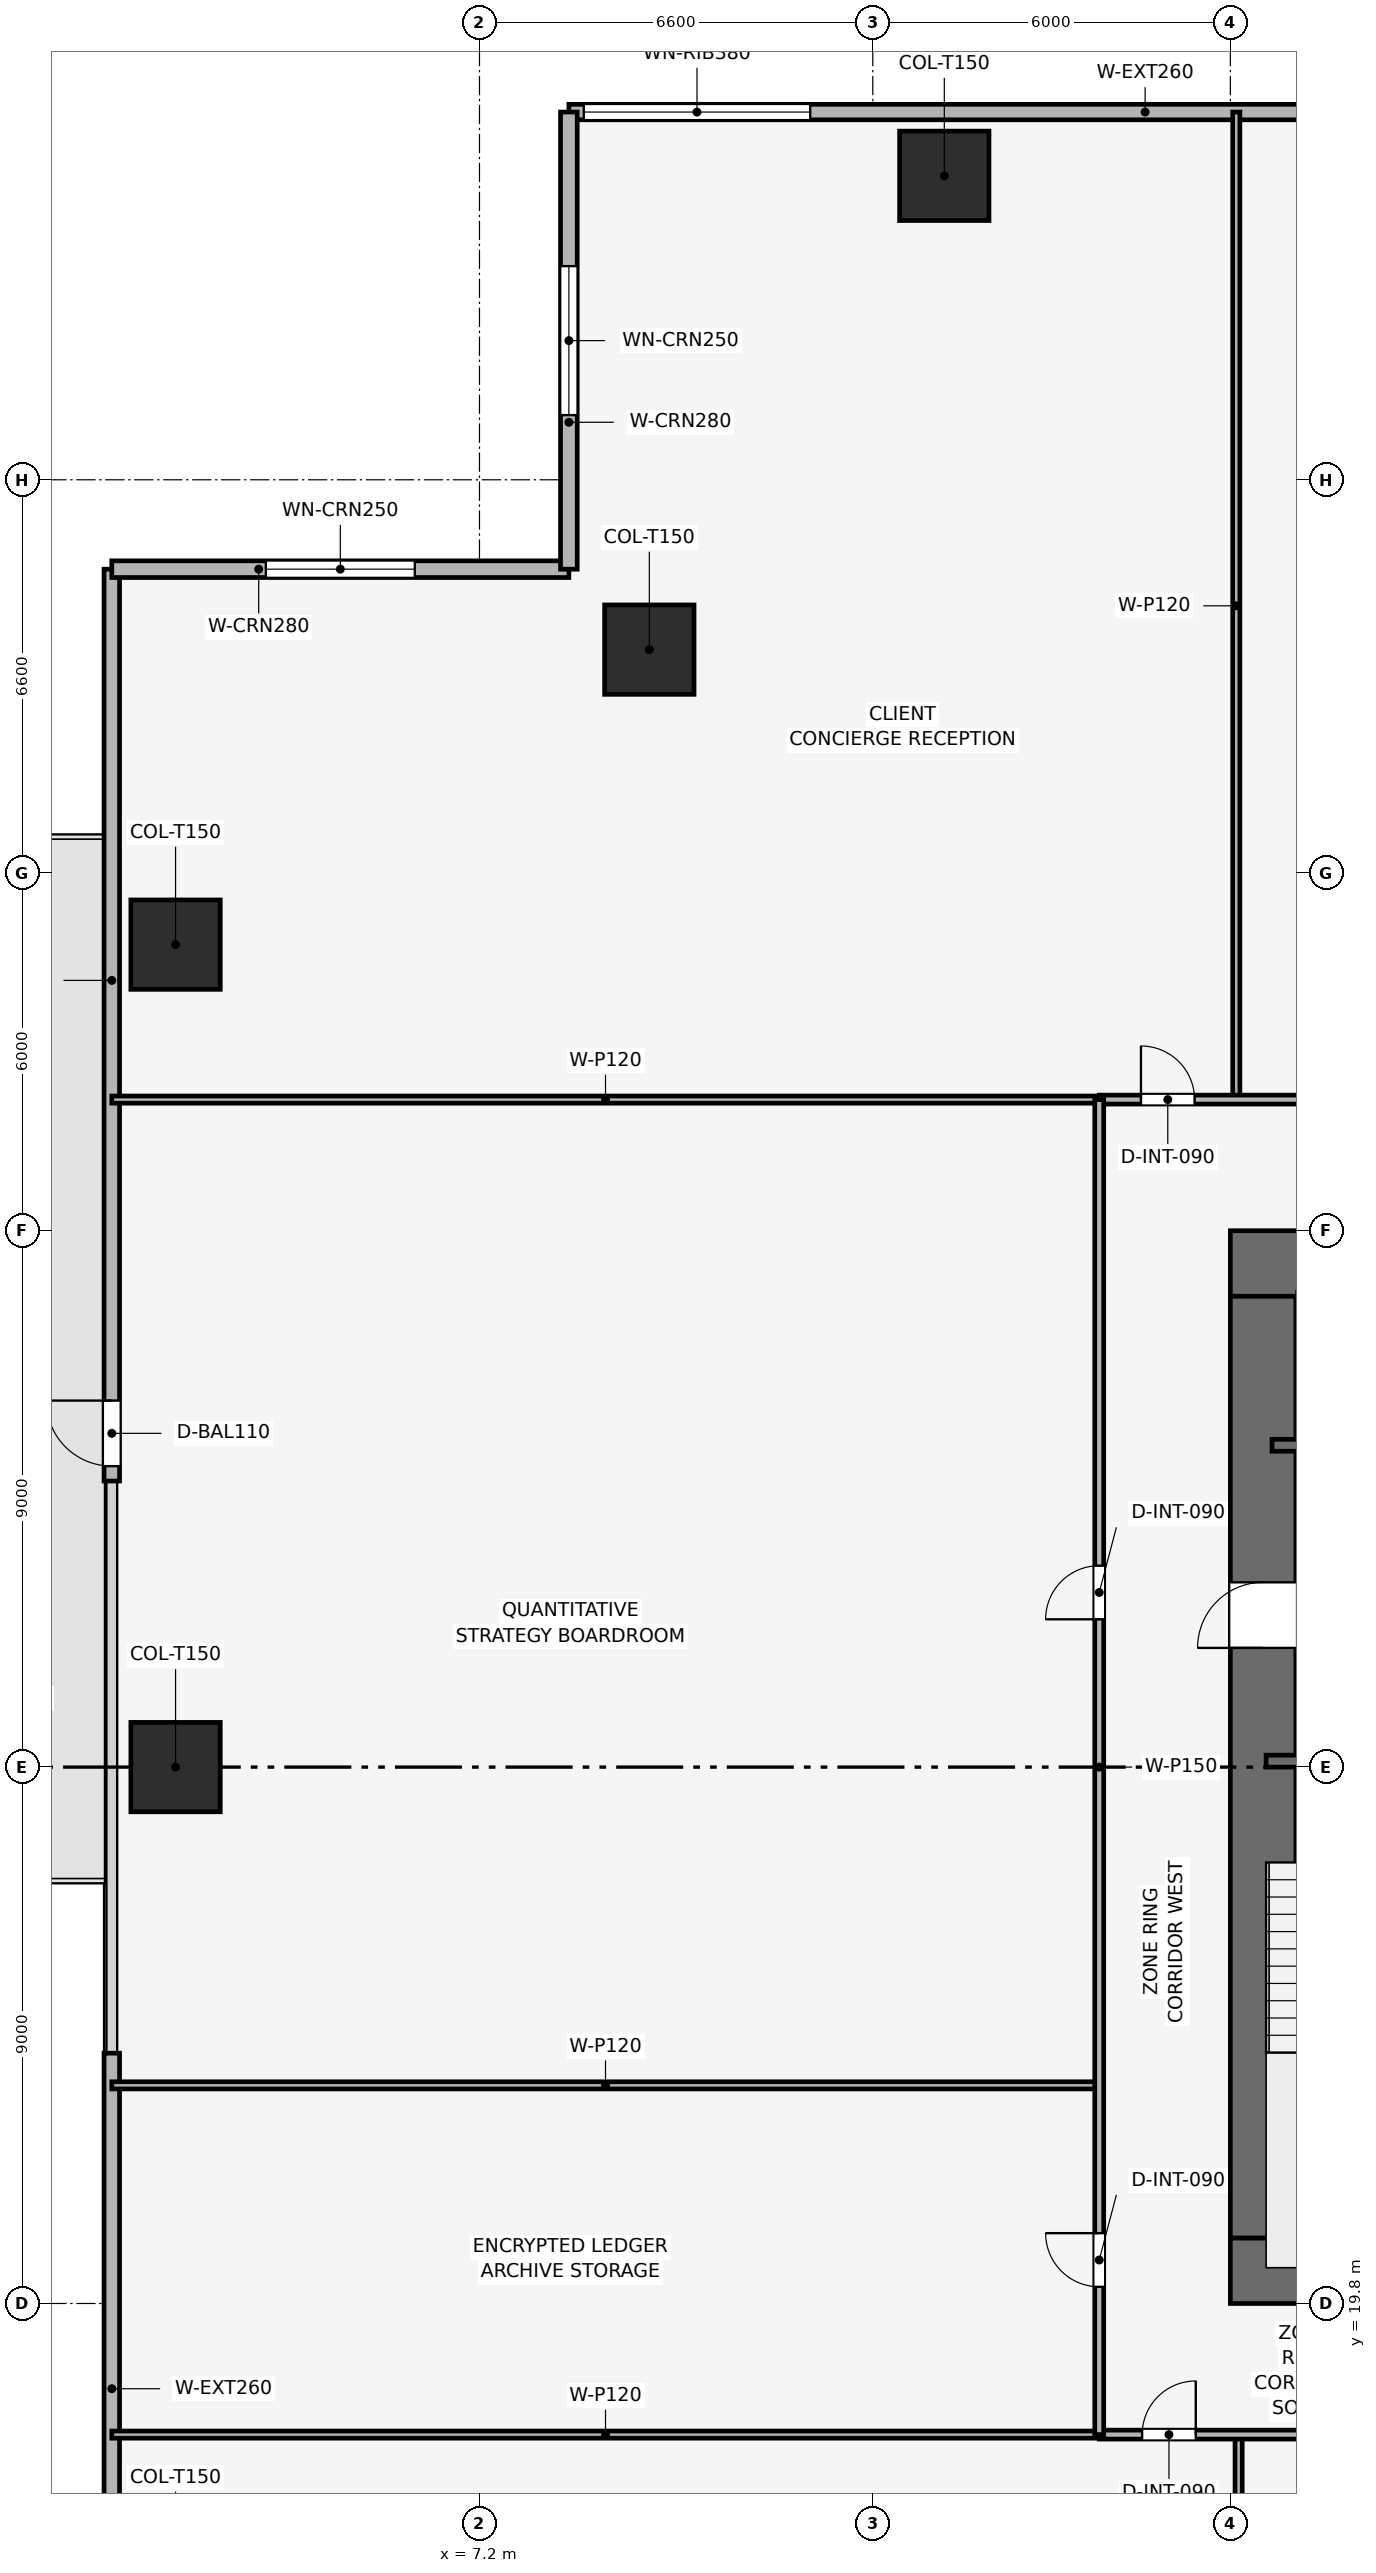
"""IFC4 building model, lengths in metres.
Left out: names, types, materials, properties, quantities, classifications, styles, units other than length and angle.
Written with IfcOpenShell. Run it as: python <this file> out.ifc"""

import sys

from ifc_helpers import new_model, si_unit, direction, frame, frame_2d, origin, origin_2d, place, context, subcontext, project, spatial, rectangle, extrude, element, fill, save


model = new_model("IFC4")
c1 = context("Model", 3, precision=1e-05, world=origin(), true_north=direction((0.0, 1.0)))
c2 = subcontext(c1, "Body", "Model", "MODEL_VIEW")
j1 = project(units=[si_unit("LENGTHUNIT", "METRE"), si_unit("PLANEANGLEUNIT", "RADIAN")], contexts=[c1])
p1 = place(None, origin())
s1 = spatial("IfcSite", under=j1, at=p1, CompositionType="ELEMENT")
p2 = place(p1, origin())
s2 = spatial("IfcBuilding", under=s1, at=p2, CompositionType="ELEMENT")
p3 = place(p2, frame((0.0, 0.0, 88.5)))
s3 = spatial("IfcBuildingStorey", under=s2, at=p3, CompositionType="ELEMENT", Elevation=88.5)
p4 = place(p3, frame((19.8, 20.35, 0.0), z_axis=(0.0, 0.0, 1.0), x_axis=(1.0, 0.0, 0.0)))
e1 = element("IfcWall", 1, at=p4, inside=s3, PredefinedType="SHEAR", context=c2, shape_type="SweptSolid", body=[
    extrude(rectangle(XDim=18.0, YDim=1.1, at=frame_2d((9.0, 0.0))), origin(), (0.0, 0.0, 1.0), 3.9),
])
p5 = place(p4, frame((8.4, 0.0, 0.0)))
e2 = element("IfcOpeningElement", 2, at=p5, cuts=e1, PredefinedType="OPENING", context=c2, shape_type="SweptSolid", body=[
    extrude(rectangle(XDim=1.2, YDim=2.2, at=frame_2d((0.6, 1.1))), frame((0.0, 0.56, 0.0), z_axis=(0.0, -1.0, 0.0), x_axis=(1.0, 0.0, 0.0)), (0.0, 0.0, 1.0), 1.12),
])
p6 = place(p3, frame((19.8, 37.25, 0.0), z_axis=(0.0, 0.0, 1.0), x_axis=(1.0, 0.0, 0.0)))
e3 = element("IfcWall", 3, at=p6, inside=s3, PredefinedType="SHEAR", context=c2, shape_type="SweptSolid", body=[
    extrude(rectangle(XDim=18.0, YDim=1.1, at=frame_2d((9.0, 0.0))), origin(), (0.0, 0.0, 1.0), 3.9),
])
p7 = place(p6, frame((7.05, 0.0, 0.0)))
e4 = element("IfcOpeningElement", 4, at=p7, cuts=e3, PredefinedType="OPENING", context=c2, shape_type="SweptSolid", body=[
    extrude(rectangle(XDim=1.1, YDim=2.15, at=frame_2d((0.55, 1.075))), frame((0.0, 0.56, 0.0), z_axis=(0.0, -1.0, 0.0), x_axis=(1.0, 0.0, 0.0)), (0.0, 0.0, 1.0), 1.12),
])
p8 = place(p3, frame((20.35, 20.9, 0.0), z_axis=(0.0, 0.0, 1.0), x_axis=(0.0, 1.0, 0.0)))
e5 = element("IfcWall", 5, at=p8, inside=s3, PredefinedType="SHEAR", context=c2, shape_type="SweptSolid", body=[
    extrude(rectangle(XDim=15.8, YDim=1.1, at=frame_2d((7.9, 0.0))), origin(), (0.0, 0.0, 1.0), 3.9),
])
p9 = place(p8, frame((9.9, 0.0, 0.0)))
e6 = element("IfcOpeningElement", 6, at=p9, cuts=e5, PredefinedType="OPENING", context=c2, shape_type="SweptSolid", body=[
    extrude(rectangle(XDim=1.1, YDim=2.15, at=frame_2d((0.55, 1.075))), frame((0.0, 0.56, 0.0), z_axis=(0.0, -1.0, 0.0), x_axis=(1.0, 0.0, 0.0)), (0.0, 0.0, 1.0), 1.12),
])
for number, where, z_axis, x_axis in (
    (7, (15.0, 55.5, 0.003), (0.0, 0.0, 1.0), (1.0, 0.0, 0.0)),
    (8, (2.1, 42.6, 0.003), (0.0, 0.0, 1.0), (1.0, 0.0, 0.0)),
    (9, (2.1, 28.8, 0.003), (0.0, 0.0, 1.0), (1.0, 0.0, 0.0)),
    (10, (10.05, 47.55, 0.003), (0.0, 0.0, 1.0), (1.0, 0.0, 0.0)),
):
    element("IfcColumn", number, at=place(p3, frame(where, z_axis=z_axis, x_axis=x_axis)), inside=s3, PredefinedType="COLUMN", context=c2, shape_type="SweptSolid", body=[
        extrude(rectangle(XDim=1.5, YDim=1.5, at=origin_2d()), origin(), (0.0, 0.0, 1.0), 3.644),
    ])
p10 = place(p3, frame((8.7, 56.57, 0.0), z_axis=(0.0, 0.0, 1.0), x_axis=(1.0, 0.0, 0.0)))
e11 = element("IfcWall", 11, at=p10, inside=s3, PredefinedType="SOLIDWALL", context=c2, shape_type="SweptSolid", body=[
    extrude(rectangle(XDim=15.3, YDim=0.26, at=frame_2d((7.65, 0.0))), origin(), (0.0, 0.0, 1.0), 3.65),
])
p11 = place(p10, frame((0.25, 0.0, 0.9)))
e12 = element("IfcOpeningElement", 12, at=p11, cuts=e11, PredefinedType="OPENING", context=c2, shape_type="SweptSolid", body=[
    extrude(rectangle(XDim=3.8, YDim=1.9, at=frame_2d((1.9, 0.95))), frame((0.0, 0.14, 0.0), z_axis=(0.0, -1.0, 0.0), x_axis=(1.0, 0.0, 0.0)), (0.0, 0.0, 1.0), 0.28),
])
p12 = place(p3, frame((1.03, 8.7, 0.0), z_axis=(0.0, 0.0, 1.0), x_axis=(0.0, 1.0, 0.0)))
e13 = element("IfcWall", 13, at=p12, inside=s3, PredefinedType="SOLIDWALL", context=c2, shape_type="SweptSolid", body=[
    extrude(rectangle(XDim=15.3, YDim=0.26, at=frame_2d((7.65, 0.0))), origin(), (0.0, 0.0, 1.0), 3.65),
])
p13 = place(p12, frame((0.25, 0.0, 0.9)))
e14 = element("IfcOpeningElement", 14, at=p13, cuts=e13, PredefinedType="OPENING", context=c2, shape_type="SweptSolid", body=[
    extrude(rectangle(XDim=3.8, YDim=1.9, at=frame_2d((1.9, 0.95))), frame((0.0, 0.14, 0.0), z_axis=(0.0, -1.0, 0.0), x_axis=(1.0, 0.0, 0.0)), (0.0, 0.0, 1.0), 0.28),
])
p14 = place(p3, frame((1.03, 33.6, 0.0), z_axis=(0.0, 0.0, 1.0), x_axis=(0.0, 1.0, 0.0)))
e15 = element("IfcWall", 15, at=p14, inside=s3, PredefinedType="SOLIDWALL", context=c2, shape_type="SweptSolid", body=[
    extrude(rectangle(XDim=15.3, YDim=0.26, at=frame_2d((7.65, 0.0))), origin(), (0.0, 0.0, 1.0), 3.65),
])
p15 = place(p14, frame((0.25, 0.0, 0.0)))
e16 = element("IfcOpeningElement", 16, at=p15, cuts=e15, PredefinedType="OPENING", context=c2, shape_type="SweptSolid", body=[
    extrude(rectangle(XDim=1.1, YDim=2.2, at=frame_2d((0.55, 1.1))), frame((0.0, 0.14, 0.0), z_axis=(0.0, -1.0, 0.0), x_axis=(1.0, 0.0, 0.0)), (0.0, 0.0, 1.0), 0.28),
])
p16 = place(p3, frame((1.03, 48.9, 0.0), z_axis=(0.0, 0.0, 1.0), x_axis=(1.0, 0.0, 0.0)))
e17 = element("IfcWall", 17, at=p16, inside=s3, PredefinedType="SOLIDWALL", context=c2, shape_type="SweptSolid", body=[
    extrude(rectangle(XDim=7.67, YDim=0.28, at=frame_2d((3.835, 0.0))), origin(), (0.0, 0.0, 1.0), 3.65),
])
p17 = place(p16, frame((2.585, 0.0, 0.9)))
e18 = element("IfcOpeningElement", 18, at=p17, cuts=e17, PredefinedType="OPENING", context=c2, shape_type="SweptSolid", body=[
    extrude(rectangle(XDim=2.5, YDim=1.9, at=frame_2d((1.25, 0.95))), frame((0.0, 0.15, 0.0), z_axis=(0.0, -1.0, 0.0), x_axis=(1.0, 0.0, 0.0)), (0.0, 0.0, 1.0), 0.3),
])
p18 = place(p3, frame((8.7, 48.9, 0.0), z_axis=(0.0, 0.0, 1.0), x_axis=(0.0, 1.0, 0.0)))
e19 = element("IfcWall", 19, at=p18, inside=s3, PredefinedType="SOLIDWALL", context=c2, shape_type="SweptSolid", body=[
    extrude(rectangle(XDim=7.67, YDim=0.28, at=frame_2d((3.835, 0.0))), origin(), (0.0, 0.0, 1.0), 3.65),
])
p19 = place(p18, frame((2.585, 0.0, 0.9)))
e20 = element("IfcOpeningElement", 20, at=p19, cuts=e19, PredefinedType="OPENING", context=c2, shape_type="SweptSolid", body=[
    extrude(rectangle(XDim=2.5, YDim=1.9, at=frame_2d((1.25, 0.95))), frame((0.0, 0.15, 0.0), z_axis=(0.0, -1.0, 0.0), x_axis=(1.0, 0.0, 0.0)), (0.0, 0.0, 1.0), 0.3),
])
p20 = place(p3, frame((20.4, 28.9, 0.0), z_axis=(0.0, 0.0, 1.0), x_axis=(1.0, 0.0, 0.0)))
e21 = element("IfcWall", 21, at=p20, inside=s3, PredefinedType="SHEAR", context=c2, shape_type="SweptSolid", body=[
    extrude(rectangle(XDim=3.15, YDim=0.2, at=frame_2d((1.575, 0.0))), origin(), (0.0, 0.0, 1.0), 3.65),
])
p21 = place(p20, frame((0.8, 0.0, 0.0)))
e22 = element("IfcOpeningElement", 22, at=p21, cuts=e21, PredefinedType="OPENING", context=c2, shape_type="SweptSolid", body=[
    extrude(rectangle(XDim=1.0, YDim=2.1, at=frame_2d((0.5, 1.05))), frame((0.0, 0.11, 0.0), z_axis=(0.0, -1.0, 0.0), x_axis=(1.0, 0.0, 0.0)), (0.0, 0.0, 1.0), 0.22),
])
p22 = place(p3, frame((20.5, 34.2, 0.0), z_axis=(0.0, 0.0, 1.0), x_axis=(1.0, 0.0, 0.0)))
e23 = element("IfcWall", 23, at=p22, inside=s3, PredefinedType="SHEAR", context=c2, shape_type="SweptSolid", body=[
    extrude(rectangle(XDim=3.05, YDim=0.2, at=frame_2d((1.525, 0.0))), origin(), (0.0, 0.0, 1.0), 3.65),
])
p23 = place(p22, frame((0.75, 0.0, 0.0)))
e24 = element("IfcOpeningElement", 24, at=p23, cuts=e23, PredefinedType="OPENING", context=c2, shape_type="SweptSolid", body=[
    extrude(rectangle(XDim=1.1, YDim=2.15, at=frame_2d((0.55, 1.075))), frame((0.0, 0.11, 0.0), z_axis=(0.0, -1.0, 0.0), x_axis=(1.0, 0.0, 0.0)), (0.0, 0.0, 1.0), 0.22),
])
for number, where, z_axis, x_axis in (
    (25, (19.939, 1.03, 0.0), (0.0, 0.0, 1.0), (0.0, 1.0, 0.0)),
    (26, (19.9, 40.0, 0.0), (0.0, 0.0, 1.0), (0.0, 1.0, 0.0)),
    (27, (1.03, 17.6, 0.0), (0.0, 0.0, 1.0), (1.0, 0.0, 0.0)),
    (28, (1.03, 40.0, 0.0), (0.0, 0.0, 1.0), (1.0, 0.0, 0.0)),
    (29, (1.03, 23.46, 0.0), (0.0, 0.0, 1.0), (1.0, 0.0, 0.0)),
):
    element("IfcWall", number, at=place(p3, frame(where, z_axis=z_axis, x_axis=x_axis)), inside=s3, PredefinedType="PARTITIONING", context=c2, shape_type="SweptSolid", body=[
        extrude(rectangle(XDim=16.57, YDim=0.12, at=frame_2d((8.285, 0.0))), origin(), (0.0, 0.0, 1.0), 2.935),
    ])
p24 = place(p3, frame((17.6, 17.6, 0.0), z_axis=(0.0, 0.0, 1.0), x_axis=(1.0, 0.0, 0.0)))
e30 = element("IfcWall", 30, at=p24, inside=s3, PredefinedType="PARTITIONING", context=c2, shape_type="SweptSolid", body=[
    extrude(rectangle(XDim=22.4, YDim=0.15, at=frame_2d((11.2, 0.0))), origin(), (0.0, 0.0, 1.0), 3.085),
])
p25 = place(p24, frame((0.72, 0.0, 0.0)))
e31 = element("IfcOpeningElement", 31, at=p25, cuts=e30, PredefinedType="OPENING", context=c2, shape_type="SweptSolid", body=[
    extrude(rectangle(XDim=0.9, YDim=2.1, at=frame_2d((0.45, 1.05))), frame((0.0, 0.085, 0.0), z_axis=(0.0, -1.0, 0.0), x_axis=(1.0, 0.0, 0.0)), (0.0, 0.0, 1.0), 0.17),
])
p26 = place(p24, frame((6.255, 0.0, 0.0)))
e32 = element("IfcOpeningElement", 32, at=p26, cuts=e30, PredefinedType="OPENING", context=c2, shape_type="SweptSolid", body=[
    extrude(rectangle(XDim=0.9, YDim=2.1, at=frame_2d((0.45, 1.05))), frame((0.0, 0.085, 0.0), z_axis=(0.0, -1.0, 0.0), x_axis=(1.0, 0.0, 0.0)), (0.0, 0.0, 1.0), 0.17),
])
p27 = place(p24, frame((16.285, 0.0, 0.0)))
e33 = element("IfcOpeningElement", 33, at=p27, cuts=e30, PredefinedType="OPENING", context=c2, shape_type="SweptSolid", body=[
    extrude(rectangle(XDim=0.9, YDim=2.1, at=frame_2d((0.45, 1.05))), frame((0.0, 0.085, 0.0), z_axis=(0.0, -1.0, 0.0), x_axis=(1.0, 0.0, 0.0)), (0.0, 0.0, 1.0), 0.17),
])
p28 = place(p3, frame((17.6, 40.0, 0.0), z_axis=(0.0, 0.0, 1.0), x_axis=(1.0, 0.0, 0.0)))
e34 = element("IfcWall", 34, at=p28, inside=s3, PredefinedType="PARTITIONING", context=c2, shape_type="SweptSolid", body=[
    extrude(rectangle(XDim=22.4, YDim=0.15, at=frame_2d((11.2, 0.0))), origin(), (0.0, 0.0, 1.0), 3.085),
])
p29 = place(p28, frame((0.7, 0.0, 0.0)))
e35 = element("IfcOpeningElement", 35, at=p29, cuts=e34, PredefinedType="OPENING", context=c2, shape_type="SweptSolid", body=[
    extrude(rectangle(XDim=0.9, YDim=2.1, at=frame_2d((0.45, 1.05))), frame((0.0, 0.085, 0.0), z_axis=(0.0, -1.0, 0.0), x_axis=(1.0, 0.0, 0.0)), (0.0, 0.0, 1.0), 0.17),
])
p30 = place(p28, frame((4.888, 0.0, 0.0)))
e36 = element("IfcOpeningElement", 36, at=p30, cuts=e34, PredefinedType="OPENING", context=c2, shape_type="SweptSolid", body=[
    extrude(rectangle(XDim=0.9, YDim=2.1, at=frame_2d((0.45, 1.05))), frame((0.0, 0.085, 0.0), z_axis=(0.0, -1.0, 0.0), x_axis=(1.0, 0.0, 0.0)), (0.0, 0.0, 1.0), 0.17),
])
p31 = place(p28, frame((10.808, 0.0, 0.0)))
e37 = element("IfcOpeningElement", 37, at=p31, cuts=e34, PredefinedType="OPENING", context=c2, shape_type="SweptSolid", body=[
    extrude(rectangle(XDim=0.9, YDim=2.1, at=frame_2d((0.45, 1.05))), frame((0.0, 0.085, 0.0), z_axis=(0.0, -1.0, 0.0), x_axis=(1.0, 0.0, 0.0)), (0.0, 0.0, 1.0), 0.17),
])
p32 = place(p28, frame((17.82, 0.0, 0.0)))
e38 = element("IfcOpeningElement", 38, at=p32, cuts=e34, PredefinedType="OPENING", context=c2, shape_type="SweptSolid", body=[
    extrude(rectangle(XDim=0.9, YDim=2.1, at=frame_2d((0.45, 1.05))), frame((0.0, 0.085, 0.0), z_axis=(0.0, -1.0, 0.0), x_axis=(1.0, 0.0, 0.0)), (0.0, 0.0, 1.0), 0.17),
])
p33 = place(p3, frame((17.6, 17.6, 0.0), z_axis=(0.0, 0.0, 1.0), x_axis=(0.0, 1.0, 0.0)))
e39 = element("IfcWall", 39, at=p33, inside=s3, PredefinedType="PARTITIONING", context=c2, shape_type="SweptSolid", body=[
    extrude(rectangle(XDim=22.4, YDim=0.15, at=frame_2d((11.2, 0.0))), origin(), (0.0, 0.0, 1.0), 3.085),
])
p34 = place(p33, frame((2.48, 0.0, 0.0)))
e40 = element("IfcOpeningElement", 40, at=p34, cuts=e39, PredefinedType="OPENING", context=c2, shape_type="SweptSolid", body=[
    extrude(rectangle(XDim=0.9, YDim=2.1, at=frame_2d((0.45, 1.05))), frame((0.0, 0.085, 0.0), z_axis=(0.0, -1.0, 0.0), x_axis=(1.0, 0.0, 0.0)), (0.0, 0.0, 1.0), 0.17),
])
p35 = place(p33, frame((13.68, 0.0, 0.0)))
e41 = element("IfcOpeningElement", 41, at=p35, cuts=e39, PredefinedType="OPENING", context=c2, shape_type="SweptSolid", body=[
    extrude(rectangle(XDim=0.9, YDim=2.1, at=frame_2d((0.45, 1.05))), frame((0.0, 0.085, 0.0), z_axis=(0.0, -1.0, 0.0), x_axis=(1.0, 0.0, 0.0)), (0.0, 0.0, 1.0), 0.17),
])
p36 = place(p11, origin())
e42 = element("IfcWindow", 42, at=p36, inside=s3, PartitioningType="SINGLE_PANEL", PredefinedType="WINDOW", context=c2, shape_type="SweptSolid", body=[
    extrude(rectangle(XDim=3.8, YDim=1.9, at=frame_2d((1.9, 0.95))), frame((0.0, 0.03, 0.0), z_axis=(0.0, -1.0, 0.0), x_axis=(1.0, 0.0, 0.0)), (0.0, 0.0, 1.0), 0.06),
])
fill(e12, e42)
p37 = place(p15, origin())
e43 = element("IfcDoor", 43, at=p37, inside=s3, OperationType="SINGLE_SWING_RIGHT", PredefinedType="DOOR", context=c2, shape_type="SweptSolid", body=[
    extrude(rectangle(XDim=1.1, YDim=2.2, at=frame_2d((0.55, 1.1))), frame((0.0, 0.025, 0.0), z_axis=(0.0, -1.0, 0.0), x_axis=(1.0, 0.0, 0.0)), (0.0, 0.0, 1.0), 0.05),
])
fill(e16, e43)
p38 = place(p17, origin())
e44 = element("IfcWindow", 44, at=p38, inside=s3, PartitioningType="SINGLE_PANEL", PredefinedType="WINDOW", context=c2, shape_type="SweptSolid", body=[
    extrude(rectangle(XDim=2.5, YDim=1.9, at=frame_2d((1.25, 0.95))), frame((0.0, 0.03, 0.0), z_axis=(0.0, -1.0, 0.0), x_axis=(1.0, 0.0, 0.0)), (0.0, 0.0, 1.0), 0.06),
])
fill(e18, e44)
p39 = place(p19, origin())
e45 = element("IfcWindow", 45, at=p39, inside=s3, PartitioningType="SINGLE_PANEL", PredefinedType="WINDOW", context=c2, shape_type="SweptSolid", body=[
    extrude(rectangle(XDim=2.5, YDim=1.9, at=frame_2d((1.25, 0.95))), frame((0.0, 0.03, 0.0), z_axis=(0.0, -1.0, 0.0), x_axis=(1.0, 0.0, 0.0)), (0.0, 0.0, 1.0), 0.06),
])
fill(e20, e45)
p40 = place(p25, origin())
e46 = element("IfcDoor", 46, at=p40, inside=s3, OperationType="SINGLE_SWING_RIGHT", PredefinedType="DOOR", context=c2, shape_type="SweptSolid", body=[
    extrude(rectangle(XDim=0.9, YDim=2.1, at=frame_2d((0.45, 1.05))), frame((0.0, 0.025, 0.0), z_axis=(0.0, -1.0, 0.0), x_axis=(1.0, 0.0, 0.0)), (0.0, 0.0, 1.0), 0.05),
])
fill(e31, e46)
p41 = place(p29, origin())
e47 = element("IfcDoor", 47, at=p41, inside=s3, OperationType="SINGLE_SWING_LEFT", PredefinedType="DOOR", context=c2, shape_type="SweptSolid", body=[
    extrude(rectangle(XDim=0.9, YDim=2.1, at=frame_2d((0.45, 1.05))), frame((0.0, 0.025, 0.0), z_axis=(0.0, -1.0, 0.0), x_axis=(1.0, 0.0, 0.0)), (0.0, 0.0, 1.0), 0.05),
])
fill(e35, e47)
p42 = place(p34, origin())
e48 = element("IfcDoor", 48, at=p42, inside=s3, OperationType="SINGLE_SWING_RIGHT", PredefinedType="DOOR", context=c2, shape_type="SweptSolid", body=[
    extrude(rectangle(XDim=0.9, YDim=2.1, at=frame_2d((0.45, 1.05))), frame((0.0, 0.025, 0.0), z_axis=(0.0, -1.0, 0.0), x_axis=(1.0, 0.0, 0.0)), (0.0, 0.0, 1.0), 0.05),
])
fill(e40, e48)
p43 = place(p35, origin())
e49 = element("IfcDoor", 49, at=p43, inside=s3, OperationType="SINGLE_SWING_LEFT", PredefinedType="DOOR", context=c2, shape_type="SweptSolid", body=[
    extrude(rectangle(XDim=0.9, YDim=2.1, at=frame_2d((0.45, 1.05))), frame((0.0, 0.025, 0.0), z_axis=(0.0, -1.0, 0.0), x_axis=(1.0, 0.0, 0.0)), (0.0, 0.0, 1.0), 0.05),
])
fill(e41, e49)
p44 = place(p9, origin())
e50 = element("IfcDoor", 50, at=p44, inside=s3, OperationType="SINGLE_SWING_LEFT", PredefinedType="DOOR", context=c2, shape_type="SweptSolid", body=[
    extrude(rectangle(XDim=1.1, YDim=2.15, at=frame_2d((0.55, 1.075))), frame((0.0, 0.025, 0.0), z_axis=(0.0, -1.0, 0.0), x_axis=(1.0, 0.0, 0.0)), (0.0, 0.0, 1.0), 0.05),
])
fill(e6, e50)
save(model, sys.argv[1])
